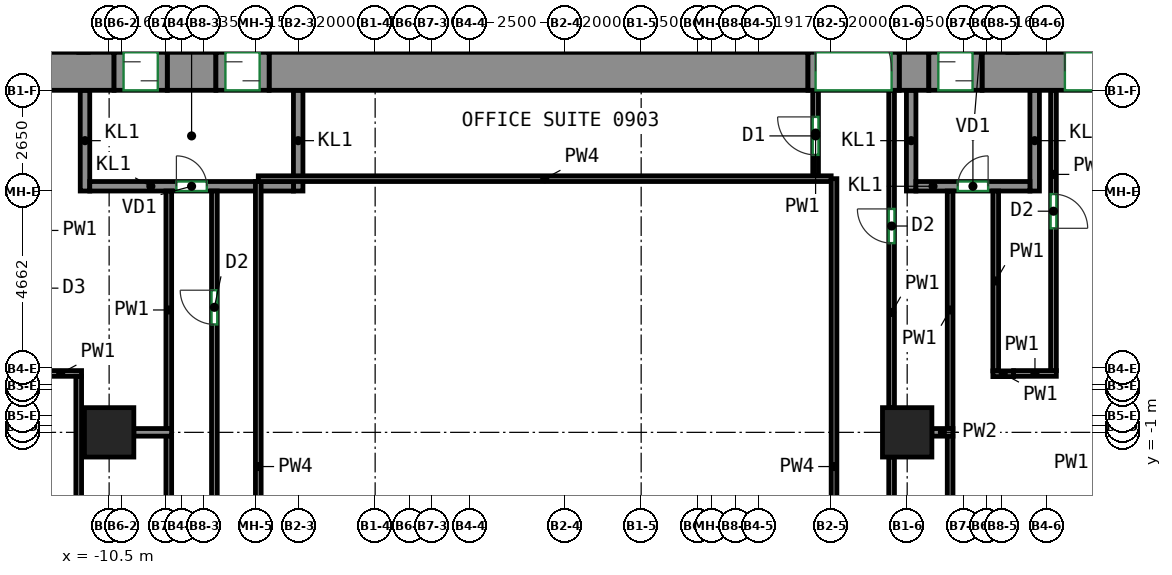
"""IFC4 building model, lengths in metres.
Left out: names, types, materials, properties, quantities, classifications, styles, units other than length and angle.
Written with IfcOpenShell. Run it as: python <this file> out.ifc"""

import sys

from ifc_helpers import new_model, si_unit, direction, frame, frame_2d, origin, origin_2d, place, context, subcontext, project, spatial, rectangle, extrude, source, transform, mapped, element, fill, save


model = new_model("IFC4")
c1 = context("Model", 3, precision=1e-05, world=origin(), true_north=direction((0.0, 1.0)))
c2 = subcontext(c1, "Body", "Model", "MODEL_VIEW")
j1 = project(units=[si_unit("LENGTHUNIT", "METRE"), si_unit("PLANEANGLEUNIT", "RADIAN")], contexts=[c1])
p1 = place(None, origin())
s1 = spatial("IfcSite", under=j1, at=p1, CompositionType="ELEMENT")
p2 = place(p1, origin())
s2 = spatial("IfcBuilding", under=s1, at=p2, CompositionType="ELEMENT")
p3 = place(p2, frame((0.0, 0.0, 43.0)))
s3 = spatial("IfcBuildingStorey", under=s2, at=p3, CompositionType="ELEMENT", Elevation=43.0)
m1 = source(origin(), c2, "Body", "SweptSolid", [
    extrude(rectangle(XDim=1.3, YDim=1.3, at=origin_2d()), origin(), (0.0, 0.0, 1.0), 3.72),
])
for number, where, z_axis, x_axis in (
    (1, (-10.5, -1.0, 0.0), (0.0, 0.0, 1.0), (1.0, 0.0, 0.0)),
    (2, (10.5, -1.0, 0.0), (0.0, 0.0, 1.0), (1.0, 0.0, 0.0)),
):
    element("IfcColumn", number, at=place(p3, frame(where, z_axis=z_axis, x_axis=x_axis)), inside=s3, PredefinedType="COLUMN", context=c2, shape_type="MappedRepresentation", body=[
        mapped(m1, transform((0.0, 0.0, 0.0))),
    ])
m2 = source(origin(), c2, "Body", "SweptSolid", [
    extrude(rectangle(XDim=5.63, YDim=1.0, at=frame_2d((2.815, 0.0))), origin(), (0.0, 0.0, 1.0), 3.72),
])
p4 = place(p3, frame((-16.0, 8.5, 0.0), z_axis=(0.0, 0.0, 1.0), x_axis=(1.0, 0.0, 0.0)))
e3 = element("IfcWall", 3, at=p4, inside=s3, PredefinedType="SHEAR", context=c2, shape_type="MappedRepresentation", body=[
    mapped(m2, transform((0.0, 0.0, 0.0))),
])
p5 = place(p4, frame((2.25, 0.0, 0.0)))
e4 = element("IfcOpeningElement", 4, at=p5, cuts=e3, PredefinedType="OPENING", context=c2, shape_type="SweptSolid", body=[
    extrude(rectangle(XDim=1.2, YDim=2.1, at=frame_2d((0.6, 1.05))), frame((0.0, 0.51, 0.0), z_axis=(0.0, -1.0, 0.0), x_axis=(1.0, 0.0, 0.0)), (0.0, 0.0, 1.0), 1.02),
])
m3 = source(origin(), c2, "Body", "SweptSolid", [
    extrude(rectangle(XDim=1.28, YDim=1.0, at=frame_2d((0.64, 0.0))), origin(), (0.0, 0.0, 1.0), 3.72),
])
p6 = place(p3, frame((-8.97, 8.5, 0.0), z_axis=(0.0, 0.0, 1.0), x_axis=(1.0, 0.0, 0.0)))
e5 = element("IfcWall", 5, at=p6, inside=s3, PredefinedType="SHEAR", context=c2, shape_type="MappedRepresentation", body=[
    mapped(m3, transform((0.0, 0.0, 0.0))),
])
m4 = source(origin(), c2, "Body", "SweptSolid", [
    extrude(rectangle(XDim=14.18, YDim=1.0, at=frame_2d((7.09, 0.0))), origin(), (0.0, 0.0, 1.0), 3.72),
])
p7 = place(p3, frame((-6.29, 8.5, 0.0), z_axis=(0.0, 0.0, 1.0), x_axis=(1.0, 0.0, 0.0)))
e6 = element("IfcWall", 6, at=p7, inside=s3, PredefinedType="SHEAR", context=c2, shape_type="MappedRepresentation", body=[
    mapped(m4, transform((0.0, 0.0, 0.0))),
])
m5 = source(origin(), c2, "Body", "SweptSolid", [
    extrude(rectangle(XDim=0.78, YDim=1.0, at=frame_2d((0.39, 0.0))), origin(), (0.0, 0.0, 1.0), 3.72),
])
p8 = place(p3, frame((10.29, 8.5, 0.0), z_axis=(0.0, 0.0, 1.0), x_axis=(1.0, 0.0, 0.0)))
e7 = element("IfcWall", 7, at=p8, inside=s3, PredefinedType="SHEAR", context=c2, shape_type="MappedRepresentation", body=[
    mapped(m5, transform((0.0, 0.0, 0.0))),
])
m6 = source(origin(), c2, "Body", "SweptSolid", [
    extrude(rectangle(XDim=5.63, YDim=1.0, at=frame_2d((2.815, 0.0))), origin(), (0.0, 0.0, 1.0), 3.72),
])
p9 = place(p3, frame((12.47, 8.5, 0.0), z_axis=(0.0, 0.0, 1.0), x_axis=(1.0, 0.0, 0.0)))
e8 = element("IfcWall", 8, at=p9, inside=s3, PredefinedType="SHEAR", context=c2, shape_type="MappedRepresentation", body=[
    mapped(m6, transform((0.0, 0.0, 0.0))),
])
p10 = place(p9, frame((2.18, 0.0, 0.0)))
e9 = element("IfcOpeningElement", 9, at=p10, cuts=e8, PredefinedType="OPENING", context=c2, shape_type="SweptSolid", body=[
    extrude(rectangle(XDim=1.2, YDim=2.1, at=frame_2d((0.6, 1.05))), frame((0.0, 0.51, 0.0), z_axis=(0.0, -1.0, 0.0), x_axis=(1.0, 0.0, 0.0)), (0.0, 0.0, 1.0), 1.02),
])
m7 = source(origin(), c2, "Body", "SweptSolid", [
    extrude(rectangle(XDim=2.65, YDim=0.25, at=frame_2d((1.325, 0.0))), origin(), (0.0, 0.0, 1.0), 3.72),
])
for number, where, z_axis, x_axis in (
    (10, (-11.135, 5.35, 0.0), (0.0, 0.0, 1.0), (0.0, 1.0, 0.0)),
    (11, (-5.525, 5.35, 0.0), (0.0, 0.0, 1.0), (0.0, 1.0, 0.0)),
):
    element("IfcWall", number, at=place(p3, frame(where, z_axis=z_axis, x_axis=x_axis)), inside=s3, PredefinedType="PARTITIONING", context=c2, shape_type="MappedRepresentation", body=[
        mapped(m7, transform((0.0, 0.0, 0.0))),
    ])
m8 = source(origin(), c2, "Body", "SweptSolid", [
    extrude(rectangle(XDim=5.36, YDim=0.25, at=frame_2d((2.68, 0.0))), origin(), (0.0, 0.0, 1.0), 3.72),
])
p11 = place(p3, frame((-11.01, 5.475, 0.0), z_axis=(0.0, 0.0, 1.0), x_axis=(1.0, 0.0, 0.0)))
e12 = element("IfcWall", 12, at=p11, inside=s3, PredefinedType="PARTITIONING", context=c2, shape_type="MappedRepresentation", body=[
    mapped(m8, transform((0.0, 0.0, 0.0))),
])
p12 = place(p11, frame((2.28, 0.0, 0.0)))
e13 = element("IfcOpeningElement", 13, at=p12, cuts=e12, PredefinedType="OPENING", context=c2, shape_type="SweptSolid", body=[
    extrude(rectangle(XDim=0.8, YDim=2.0, at=frame_2d((0.4, 1.0))), frame((0.0, 0.135, 0.0), z_axis=(0.0, -1.0, 0.0), x_axis=(1.0, 0.0, 0.0)), (0.0, 0.0, 1.0), 0.27),
])
for number, where, z_axis, x_axis in (
    (14, (10.605, 5.35, 0.0), (0.0, 0.0, 1.0), (0.0, 1.0, 0.0)),
    (15, (13.855, 5.35, 0.0), (0.0, 0.0, 1.0), (0.0, 1.0, 0.0)),
):
    element("IfcWall", number, at=place(p3, frame(where, z_axis=z_axis, x_axis=x_axis)), inside=s3, PredefinedType="PARTITIONING", context=c2, shape_type="MappedRepresentation", body=[
        mapped(m7, transform((0.0, 0.0, 0.0))),
    ])
m9 = source(origin(), c2, "Body", "SweptSolid", [
    extrude(rectangle(XDim=3.0, YDim=0.25, at=frame_2d((1.5, 0.0))), origin(), (0.0, 0.0, 1.0), 3.72),
])
p13 = place(p3, frame((10.73, 5.475, 0.0), z_axis=(0.0, 0.0, 1.0), x_axis=(1.0, 0.0, 0.0)))
e16 = element("IfcWall", 16, at=p13, inside=s3, PredefinedType="PARTITIONING", context=c2, shape_type="MappedRepresentation", body=[
    mapped(m9, transform((0.0, 0.0, 0.0))),
])
p14 = place(p13, frame((1.1, 0.0, 0.0)))
e17 = element("IfcOpeningElement", 17, at=p14, cuts=e16, PredefinedType="OPENING", context=c2, shape_type="SweptSolid", body=[
    extrude(rectangle(XDim=0.8, YDim=2.0, at=frame_2d((0.4, 1.0))), frame((0.0, 0.135, 0.0), z_axis=(0.0, -1.0, 0.0), x_axis=(1.0, 0.0, 0.0)), (0.0, 0.0, 1.0), 0.27),
])
m10 = source(origin(), c2, "Body", "SweptSolid", [
    extrude(rectangle(XDim=1.4, YDim=1.0, at=frame_2d((0.7, 0.0))), origin(), (0.0, 0.0, 1.0), 2.7),
])
p15 = place(p3, frame((-10.37, 8.5, 0.0), z_axis=(0.0, 0.0, 1.0), x_axis=(1.0, 0.0, 0.0)))
e18 = element("IfcWall", 18, at=p15, inside=s3, PredefinedType="PARTITIONING", context=c2, shape_type="MappedRepresentation", body=[
    mapped(m10, transform((0.0, 0.0, 0.0))),
])
p16 = place(p15, frame((0.25, 0.0, 0.0)))
e19 = element("IfcOpeningElement", 19, at=p16, cuts=e18, PredefinedType="OPENING", context=c2, shape_type="SweptSolid", body=[
    extrude(rectangle(XDim=0.9, YDim=2.1, at=frame_2d((0.45, 1.05))), frame((0.0, 0.51, 0.0), z_axis=(0.0, -1.0, 0.0), x_axis=(1.0, 0.0, 0.0)), (0.0, 0.0, 1.0), 1.02),
])
m11 = source(origin(), c2, "Body", "SweptSolid", [
    extrude(rectangle(XDim=1.4, YDim=1.0, at=frame_2d((0.7, 0.0))), origin(), (0.0, 0.0, 1.0), 2.7),
])
p17 = place(p3, frame((-7.69, 8.5, 0.0), z_axis=(0.0, 0.0, 1.0), x_axis=(1.0, 0.0, 0.0)))
e20 = element("IfcWall", 20, at=p17, inside=s3, PredefinedType="PARTITIONING", context=c2, shape_type="MappedRepresentation", body=[
    mapped(m11, transform((0.0, 0.0, 0.0))),
])
p18 = place(p17, frame((0.25, 0.0, 0.0)))
e21 = element("IfcOpeningElement", 21, at=p18, cuts=e20, PredefinedType="OPENING", context=c2, shape_type="SweptSolid", body=[
    extrude(rectangle(XDim=0.9, YDim=2.1, at=frame_2d((0.45, 1.05))), frame((0.0, 0.51, 0.0), z_axis=(0.0, -1.0, 0.0), x_axis=(1.0, 0.0, 0.0)), (0.0, 0.0, 1.0), 1.02),
])
m12 = source(origin(), c2, "Body", "SweptSolid", [
    extrude(rectangle(XDim=2.4, YDim=1.0, at=frame_2d((1.2, 0.0))), origin(), (0.0, 0.0, 1.0), 2.7),
])
p19 = place(p3, frame((7.89, 8.5, 0.0), z_axis=(0.0, 0.0, 1.0), x_axis=(1.0, 0.0, 0.0)))
e22 = element("IfcWall", 22, at=p19, inside=s3, PredefinedType="PARTITIONING", context=c2, shape_type="MappedRepresentation", body=[
    mapped(m12, transform((0.0, 0.0, 0.0))),
])
p20 = place(p19, frame((0.2, 0.0, 0.0)))
e23 = element("IfcOpeningElement", 23, at=p20, cuts=e22, PredefinedType="OPENING", context=c2, shape_type="SweptSolid", body=[
    extrude(rectangle(XDim=2.0, YDim=2.1, at=frame_2d((1.0, 1.05))), frame((0.0, 0.51, 0.0), z_axis=(0.0, -1.0, 0.0), x_axis=(1.0, 0.0, 0.0)), (0.0, 0.0, 1.0), 1.02),
])
p21 = place(p3, frame((11.07, 8.5, 0.0), z_axis=(0.0, 0.0, 1.0), x_axis=(1.0, 0.0, 0.0)))
e24 = element("IfcWall", 24, at=p21, inside=s3, PredefinedType="PARTITIONING", context=c2, shape_type="MappedRepresentation", body=[
    mapped(m11, transform((0.0, 0.0, 0.0))),
])
p22 = place(p21, frame((0.25, 0.0, 0.0)))
e25 = element("IfcOpeningElement", 25, at=p22, cuts=e24, PredefinedType="OPENING", context=c2, shape_type="SweptSolid", body=[
    extrude(rectangle(XDim=0.9, YDim=2.1, at=frame_2d((0.45, 1.05))), frame((0.0, 0.51, 0.0), z_axis=(0.0, -1.0, 0.0), x_axis=(1.0, 0.0, 0.0)), (0.0, 0.0, 1.0), 1.02),
])
p23 = place(p3, frame((-12.325, 0.55, 0.0), z_axis=(0.0, 0.0, 1.0), x_axis=(1.0, 0.0, 0.0)))
e26 = element("IfcWall", 26, at=p23, inside=s3, PredefinedType="PARTITIONING", context=c2, shape_type="SweptSolid", body=[
    extrude(rectangle(XDim=1.1, YDim=0.15, at=frame_2d((0.55, 0.0))), origin(), (0.0, 0.0, 1.0), 3.72),
])
p24 = place(p3, frame((-8.93, -0.91, 0.0), z_axis=(0.0, 0.0, 1.0), x_axis=(0.0, 1.0, 0.0)))
e27 = element("IfcWall", 27, at=p24, inside=s3, PredefinedType="PARTITIONING", context=c2, shape_type="SweptSolid", body=[
    extrude(rectangle(XDim=6.26, YDim=0.15, at=frame_2d((3.13, 0.0))), origin(), (0.0, 0.0, 1.0), 3.72),
])
p25 = place(p3, frame((-7.73, -14.125, 0.0), z_axis=(0.0, 0.0, 1.0), x_axis=(0.0, 1.0, 0.0)))
e28 = element("IfcWall", 28, at=p25, inside=s3, PredefinedType="PARTITIONING", context=c2, shape_type="SweptSolid", body=[
    extrude(rectangle(XDim=19.475, YDim=0.15, at=frame_2d((9.738, 0.0))), origin(), (0.0, 0.0, 1.0), 3.72),
])
p26 = place(p25, frame((15.965, 0.0, 0.0)))
e29 = element("IfcOpeningElement", 29, at=p26, cuts=e28, PredefinedType="OPENING", context=c2, shape_type="SweptSolid", body=[
    extrude(rectangle(XDim=0.9, YDim=2.1, at=frame_2d((0.45, 1.05))), frame((0.0, 0.085, 0.0), z_axis=(0.0, -1.0, 0.0), x_axis=(1.0, 0.0, 0.0)), (0.0, 0.0, 1.0), 0.17),
])
p27 = place(p3, frame((-11.3, -10.01, 0.0), z_axis=(0.0, 0.0, 1.0), x_axis=(0.0, 1.0, 0.0)))
e30 = element("IfcWall", 30, at=p27, inside=s3, PredefinedType="PARTITIONING", context=c2, shape_type="SweptSolid", body=[
    extrude(rectangle(XDim=10.485, YDim=0.15, at=frame_2d((5.243, 0.0))), origin(), (0.0, 0.0, 1.0), 3.72),
])
p28 = place(p3, frame((-8.93, -14.125, 0.0), z_axis=(0.0, 0.0, 1.0), x_axis=(0.0, 1.0, 0.0)))
e31 = element("IfcWall", 31, at=p28, inside=s3, PredefinedType="PARTITIONING", context=c2, shape_type="SweptSolid", body=[
    extrude(rectangle(XDim=13.035, YDim=0.15, at=frame_2d((6.518, 0.0))), origin(), (0.0, 0.0, 1.0), 3.72),
])
p29 = place(p28, frame((2.407, 0.0, 0.0)))
e32 = element("IfcOpeningElement", 32, at=p29, cuts=e31, PredefinedType="OPENING", context=c2, shape_type="SweptSolid", body=[
    extrude(rectangle(XDim=0.9, YDim=2.1, at=frame_2d((0.45, 1.05))), frame((0.0, 0.085, 0.0), z_axis=(0.0, -1.0, 0.0), x_axis=(1.0, 0.0, 0.0)), (0.0, 0.0, 1.0), 0.17),
])
p30 = place(p3, frame((10.09, -9.35, 0.0), z_axis=(0.0, 0.0, 1.0), x_axis=(0.0, 1.0, 0.0)))
e33 = element("IfcWall", 33, at=p30, inside=s3, PredefinedType="PARTITIONING", context=c2, shape_type="SweptSolid", body=[
    extrude(rectangle(XDim=7.7, YDim=0.15, at=frame_2d((3.85, 0.0))), origin(), (0.0, 0.0, 1.0), 3.72),
])
p31 = place(p3, frame((11.63, -14.125, 0.0), z_axis=(0.0, 0.0, 1.0), x_axis=(0.0, 1.0, 0.0)))
e34 = element("IfcWall", 34, at=p31, inside=s3, PredefinedType="PARTITIONING", context=c2, shape_type="SweptSolid", body=[
    extrude(rectangle(XDim=13.035, YDim=0.15, at=frame_2d((6.518, 0.0))), origin(), (0.0, 0.0, 1.0), 3.72),
])
p32 = place(p31, frame((0.701, 0.0, 0.0)))
e35 = element("IfcOpeningElement", 35, at=p32, cuts=e34, PredefinedType="OPENING", context=c2, shape_type="SweptSolid", body=[
    extrude(rectangle(XDim=0.9, YDim=2.1, at=frame_2d((0.45, 1.05))), frame((0.0, 0.085, 0.0), z_axis=(0.0, -1.0, 0.0), x_axis=(1.0, 0.0, 0.0)), (0.0, 0.0, 1.0), 0.17),
])
p33 = place(p3, frame((10.09, -0.35, 0.0), z_axis=(0.0, 0.0, 1.0), x_axis=(0.0, 1.0, 0.0)))
e36 = element("IfcWall", 36, at=p33, inside=s3, PredefinedType="PARTITIONING", context=c2, shape_type="SweptSolid", body=[
    extrude(rectangle(XDim=8.35, YDim=0.15, at=frame_2d((4.175, 0.0))), origin(), (0.0, 0.0, 1.0), 3.72),
])
p34 = place(p33, frame((4.329, 0.0, 0.0)))
e37 = element("IfcOpeningElement", 37, at=p34, cuts=e36, PredefinedType="OPENING", context=c2, shape_type="SweptSolid", body=[
    extrude(rectangle(XDim=0.9, YDim=2.1, at=frame_2d((0.45, 1.05))), frame((0.0, 0.085, 0.0), z_axis=(0.0, -1.0, 0.0), x_axis=(1.0, 0.0, 0.0)), (0.0, 0.0, 1.0), 0.17),
])
p35 = place(p3, frame((11.63, -0.91, 0.0), z_axis=(0.0, 0.0, 1.0), x_axis=(0.0, 1.0, 0.0)))
e38 = element("IfcWall", 38, at=p35, inside=s3, PredefinedType="PARTITIONING", context=c2, shape_type="SweptSolid", body=[
    extrude(rectangle(XDim=6.26, YDim=0.15, at=frame_2d((3.13, 0.0))), origin(), (0.0, 0.0, 1.0), 3.72),
])
p36 = place(p3, frame((12.83, 0.617, 0.0), z_axis=(0.0, 0.0, 1.0), x_axis=(0.0, 1.0, 0.0)))
e39 = element("IfcWall", 39, at=p36, inside=s3, PredefinedType="PARTITIONING", context=c2, shape_type="SweptSolid", body=[
    extrude(rectangle(XDim=4.733, YDim=0.15, at=frame_2d((2.367, 0.0))), origin(), (0.0, 0.0, 1.0), 3.72),
])
p37 = place(p3, frame((13.3, 0.542, 0.0), z_axis=(0.0, 0.0, 1.0), x_axis=(-1.0, 0.0, 0.0)))
e40 = element("IfcWall", 40, at=p37, inside=s3, PredefinedType="PARTITIONING", context=c2, shape_type="SweptSolid", body=[
    extrude(rectangle(XDim=0.545, YDim=0.15, at=frame_2d((0.272, 0.0))), origin(), (0.0, 0.0, 1.0), 3.72),
])
p38 = place(p3, frame((13.3, 0.55, 0.0), z_axis=(0.0, 0.0, 1.0), x_axis=(1.0, 0.0, 0.0)))
e41 = element("IfcWall", 41, at=p38, inside=s3, PredefinedType="PARTITIONING", context=c2, shape_type="SweptSolid", body=[
    extrude(rectangle(XDim=1.125, YDim=0.15, at=frame_2d((0.562, 0.0))), origin(), (0.0, 0.0, 1.0), 3.72),
])
p39 = place(p3, frame((14.35, 8.0, 0.0), z_axis=(0.0, 0.0, 1.0), x_axis=(0.0, -1.0, 0.0)))
e42 = element("IfcWall", 42, at=p39, inside=s3, PredefinedType="PARTITIONING", context=c2, shape_type="SweptSolid", body=[
    extrude(rectangle(XDim=7.375, YDim=0.15, at=frame_2d((3.688, 0.0))), origin(), (0.0, 0.0, 1.0), 3.72),
])
p40 = place(p39, frame((2.731, 0.0, 0.0)))
e43 = element("IfcOpeningElement", 43, at=p40, cuts=e42, PredefinedType="OPENING", context=c2, shape_type="SweptSolid", body=[
    extrude(rectangle(XDim=0.9, YDim=2.1, at=frame_2d((0.45, 1.05))), frame((0.0, 0.085, 0.0), z_axis=(0.0, -1.0, 0.0), x_axis=(1.0, 0.0, 0.0)), (0.0, 0.0, 1.0), 0.17),
])
p41 = place(p3, frame((8.09, 5.75, 0.0), z_axis=(0.0, 0.0, 1.0), x_axis=(0.0, 1.0, 0.0)))
e44 = element("IfcWall", 44, at=p41, inside=s3, PredefinedType="PARTITIONING", context=c2, shape_type="SweptSolid", body=[
    extrude(rectangle(XDim=2.25, YDim=0.15, at=frame_2d((1.125, 0.0))), origin(), (0.0, 0.0, 1.0), 3.72),
])
p42 = place(p41, frame((0.55, 0.0, 0.0)))
e45 = element("IfcOpeningElement", 45, at=p42, cuts=e44, PredefinedType="OPENING", context=c2, shape_type="SweptSolid", body=[
    extrude(rectangle(XDim=1.0, YDim=2.1, at=frame_2d((0.5, 1.05))), frame((0.0, 0.085, 0.0), z_axis=(0.0, -1.0, 0.0), x_axis=(1.0, 0.0, 0.0)), (0.0, 0.0, 1.0), 0.17),
])
p43 = place(p3, frame((-9.85, -1.0, 0.0), z_axis=(0.0, 0.0, 1.0), x_axis=(1.0, 0.0, 0.0)))
e46 = element("IfcWall", 46, at=p43, inside=s3, PredefinedType="PARTITIONING", context=c2, shape_type="SweptSolid", body=[
    extrude(rectangle(XDim=0.994, YDim=0.2, at=frame_2d((0.497, 0.0))), origin(), (0.0, 0.0, 1.0), 3.07),
])
p44 = place(p3, frame((11.15, -1.0, 0.0), z_axis=(0.0, 0.0, 1.0), x_axis=(1.0, 0.0, 0.0)))
e47 = element("IfcWall", 47, at=p44, inside=s3, PredefinedType="PARTITIONING", context=c2, shape_type="SweptSolid", body=[
    extrude(rectangle(XDim=0.554, YDim=0.2, at=frame_2d((0.277, 0.0))), origin(), (0.0, 0.0, 1.0), 3.72),
])
p45 = place(p3, frame((-6.575, -9.4, 0.0), z_axis=(0.0, 0.0, 1.0), x_axis=(0.0, 1.0, 0.0)))
e48 = element("IfcWall", 48, at=p45, inside=s3, PredefinedType="PARTITIONING", context=c2, shape_type="SweptSolid", body=[
    extrude(rectangle(XDim=15.0, YDim=0.15, at=frame_2d((7.5, 0.0))), origin(), (0.0, 0.0, 1.0), 3.72),
])
p46 = place(p3, frame((-6.575, 5.675, 0.0), z_axis=(0.0, 0.0, 1.0), x_axis=(1.0, 0.0, 0.0)))
e49 = element("IfcWall", 49, at=p46, inside=s3, PredefinedType="PARTITIONING", context=c2, shape_type="SweptSolid", body=[
    extrude(rectangle(XDim=15.075, YDim=0.15, at=frame_2d((7.538, 0.0))), origin(), (0.0, 0.0, 1.0), 3.72),
])
p47 = place(p3, frame((8.575, 5.675, 0.0), z_axis=(0.0, 0.0, 1.0), x_axis=(0.0, -1.0, 0.0)))
e50 = element("IfcWall", 50, at=p47, inside=s3, PredefinedType="PARTITIONING", context=c2, shape_type="SweptSolid", body=[
    extrude(rectangle(XDim=15.15, YDim=0.15, at=frame_2d((7.575, 0.0))), origin(), (0.0, 0.0, 1.0), 3.72),
])
p48 = place(p20, origin())
e51 = element("IfcDoor", 51, at=p48, inside=s3, OperationType="DOUBLE_DOOR_SINGLE_SWING", PredefinedType="DOOR", context=c2, shape_type="SweptSolid", body=[
    extrude(rectangle(XDim=2.0, YDim=2.1, at=frame_2d((1.0, 1.05))), frame((0.0, 0.405, 0.0), z_axis=(0.0, -1.0, 0.0), x_axis=(1.0, 0.0, 0.0)), (0.0, 0.0, 1.0), 0.05),
])
fill(e23, e51)
p49 = place(p12, origin())
e52 = element("IfcDoor", 52, at=p49, inside=s3, OperationType="SINGLE_SWING_LEFT", PredefinedType="DOOR", context=c2, shape_type="SweptSolid", body=[
    extrude(rectangle(XDim=0.8, YDim=2.0, at=frame_2d((0.4, 1.0))), frame((0.0, 0.025, 0.0), z_axis=(0.0, -1.0, 0.0), x_axis=(1.0, 0.0, 0.0)), (0.0, 0.0, 1.0), 0.05),
])
fill(e13, e52)
p50 = place(p14, origin())
e53 = element("IfcDoor", 53, at=p50, inside=s3, OperationType="SINGLE_SWING_RIGHT", PredefinedType="DOOR", context=c2, shape_type="SweptSolid", body=[
    extrude(rectangle(XDim=0.8, YDim=2.0, at=frame_2d((0.4, 1.0))), frame((0.0, 0.025, 0.0), z_axis=(0.0, -1.0, 0.0), x_axis=(1.0, 0.0, 0.0)), (0.0, 0.0, 1.0), 0.05),
])
fill(e17, e53)
p51 = place(p16, origin())
e54 = element("IfcDoor", 54, at=p51, inside=s3, OperationType="SLIDING_TO_LEFT", PredefinedType="DOOR", context=c2, shape_type="SweptSolid", body=[
    extrude(rectangle(XDim=0.9, YDim=2.1, at=frame_2d((0.45, 1.05))), frame((0.0, 0.405, 0.0), z_axis=(0.0, -1.0, 0.0), x_axis=(1.0, 0.0, 0.0)), (0.0, 0.0, 1.0), 0.05),
])
fill(e19, e54)
p52 = place(p18, origin())
e55 = element("IfcDoor", 55, at=p52, inside=s3, OperationType="SLIDING_TO_RIGHT", PredefinedType="DOOR", context=c2, shape_type="SweptSolid", body=[
    extrude(rectangle(XDim=0.9, YDim=2.1, at=frame_2d((0.45, 1.05))), frame((0.0, 0.405, 0.0), z_axis=(0.0, -1.0, 0.0), x_axis=(1.0, 0.0, 0.0)), (0.0, 0.0, 1.0), 0.05),
])
fill(e21, e55)
p53 = place(p22, origin())
e56 = element("IfcDoor", 56, at=p53, inside=s3, OperationType="SLIDING_TO_LEFT", PredefinedType="DOOR", context=c2, shape_type="SweptSolid", body=[
    extrude(rectangle(XDim=0.9, YDim=2.1, at=frame_2d((0.45, 1.05))), frame((0.0, 0.405, 0.0), z_axis=(0.0, -1.0, 0.0), x_axis=(1.0, 0.0, 0.0)), (0.0, 0.0, 1.0), 0.05),
])
fill(e25, e56)
p54 = place(p10, origin())
e57 = element("IfcDoor", 57, at=p54, inside=s3, OperationType="DOUBLE_DOOR_SINGLE_SWING", PredefinedType="DOOR", context=c2, shape_type="SweptSolid", body=[
    extrude(rectangle(XDim=1.2, YDim=2.1, at=frame_2d((0.6, 1.05))), frame((0.0, 0.405, 0.0), z_axis=(0.0, -1.0, 0.0), x_axis=(1.0, 0.0, 0.0)), (0.0, 0.0, 1.0), 0.05),
])
fill(e9, e57)
p55 = place(p26, origin())
e58 = element("IfcDoor", 58, at=p55, inside=s3, OperationType="SINGLE_SWING_RIGHT", PredefinedType="DOOR", context=c2, shape_type="SweptSolid", body=[
    extrude(rectangle(XDim=0.9, YDim=2.1, at=frame_2d((0.45, 1.05))), frame((0.0, 0.025, 0.0), z_axis=(0.0, -1.0, 0.0), x_axis=(1.0, 0.0, 0.0)), (0.0, 0.0, 1.0), 0.05),
])
fill(e29, e58)
p56 = place(p34, origin())
e59 = element("IfcDoor", 59, at=p56, inside=s3, OperationType="SINGLE_SWING_RIGHT", PredefinedType="DOOR", context=c2, shape_type="SweptSolid", body=[
    extrude(rectangle(XDim=0.9, YDim=2.1, at=frame_2d((0.45, 1.05))), frame((0.0, 0.025, 0.0), z_axis=(0.0, -1.0, 0.0), x_axis=(1.0, 0.0, 0.0)), (0.0, 0.0, 1.0), 0.05),
])
fill(e37, e59)
p57 = place(p40, origin())
e60 = element("IfcDoor", 60, at=p57, inside=s3, OperationType="SINGLE_SWING_RIGHT", PredefinedType="DOOR", context=c2, shape_type="SweptSolid", body=[
    extrude(rectangle(XDim=0.9, YDim=2.1, at=frame_2d((0.45, 1.05))), frame((0.0, 0.025, 0.0), z_axis=(0.0, -1.0, 0.0), x_axis=(1.0, 0.0, 0.0)), (0.0, 0.0, 1.0), 0.05),
])
fill(e43, e60)
p58 = place(p42, origin())
e61 = element("IfcDoor", 61, at=p58, inside=s3, OperationType="SINGLE_SWING_RIGHT", PredefinedType="DOOR", context=c2, shape_type="SweptSolid", body=[
    extrude(rectangle(XDim=1.0, YDim=2.1, at=frame_2d((0.5, 1.05))), frame((0.0, 0.025, 0.0), z_axis=(0.0, -1.0, 0.0), x_axis=(1.0, 0.0, 0.0)), (0.0, 0.0, 1.0), 0.05),
])
fill(e45, e61)
save(model, sys.argv[1])
